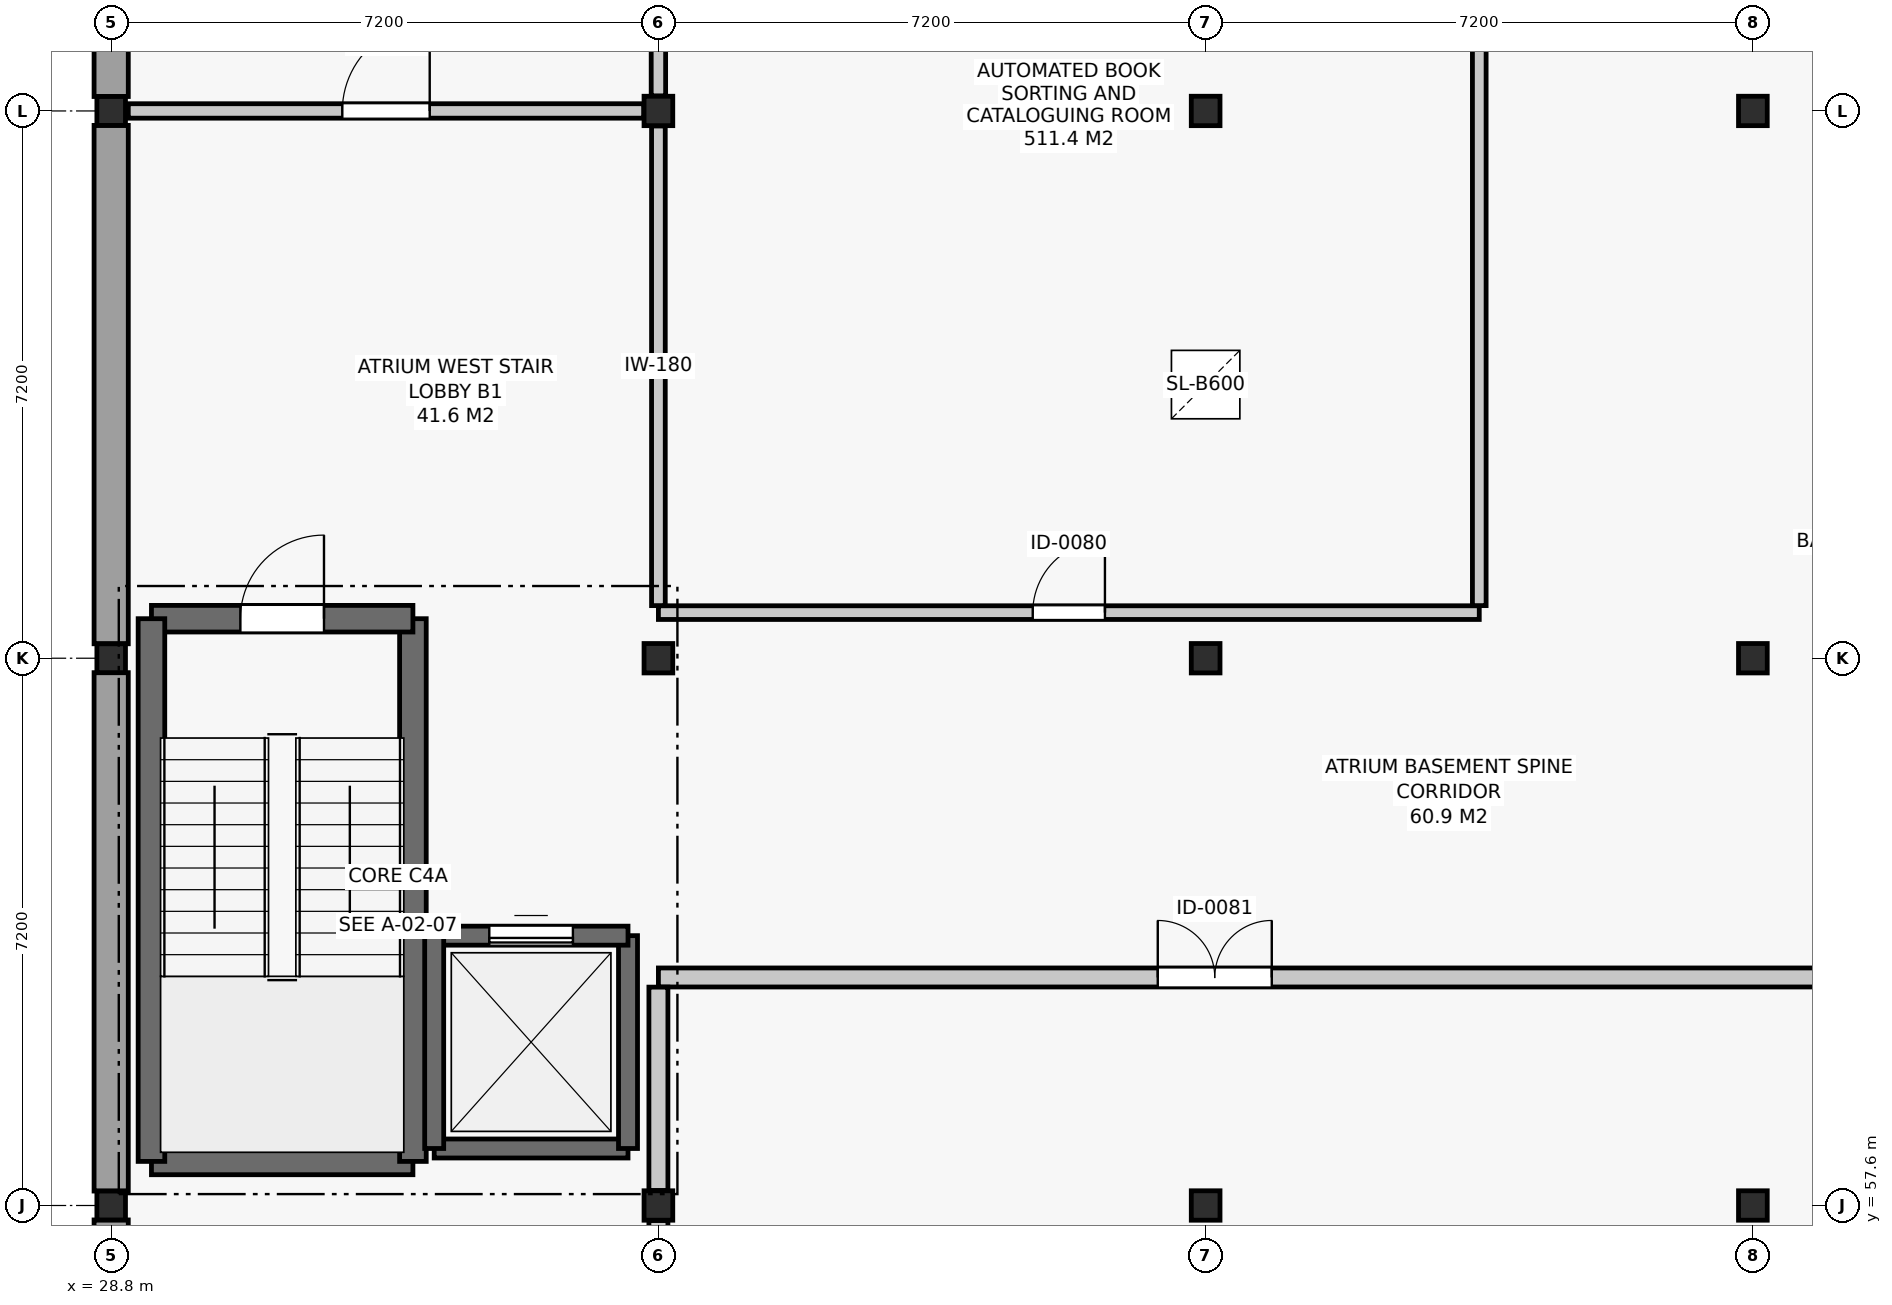
"""IFC4 building model, lengths in metres.
Left out: names, types, materials, properties, quantities, classifications, styles, units other than length and angle.
Written with IfcOpenShell. Run it as: python <this file> out.ifc"""

import sys

from ifc_helpers import new_model, si_unit, direction, frame, frame_2d, origin, origin_2d, place, context, subcontext, project, spatial, rectangle, i_section, extrude, element, fill, save


model = new_model("IFC4")
c1 = context("Model", 3, precision=1e-05, world=origin(), true_north=direction((0.0, 1.0)))
c2 = subcontext(c1, "Body", "Model", "MODEL_VIEW")
j1 = project(units=[si_unit("LENGTHUNIT", "METRE"), si_unit("PLANEANGLEUNIT", "RADIAN")], contexts=[c1])
p1 = place(None, origin())
s1 = spatial("IfcSite", under=j1, at=p1, CompositionType="ELEMENT")
p2 = place(p1, origin())
s2 = spatial("IfcBuilding", under=s1, at=p2, CompositionType="ELEMENT")
p3 = place(p2, frame((0.0, 0.0, -4.2)))
s3 = spatial("IfcBuildingStorey", under=s2, at=p3, CompositionType="ELEMENT", Elevation=-4.2)
for number, where, z_axis, x_axis in (
    (1, (28.8, 57.6, 0.0), (0.0, 0.0, 1.0), (1.0, 0.0, 0.0)),
    (2, (28.8, 64.8, 0.0), (0.0, 0.0, 1.0), (1.0, 0.0, 0.0)),
    (3, (28.8, 72.0, 0.0), (0.0, 0.0, 1.0), (1.0, 0.0, 0.0)),
):
    element("IfcColumn", number, at=place(p3, frame(where, z_axis=z_axis, x_axis=x_axis)), inside=s3, PredefinedType="COLUMN", context=c2, shape_type="SweptSolid", body=[
        extrude(i_section(OverallWidth=0.376, OverallDepth=0.38, WebThickness=0.017, FlangeThickness=0.027, FilletRadius=0.015, at=origin_2d()), origin(), (0.0, 0.0, 1.0), 4.2),
    ])
for number, where, z_axis, x_axis in (
    (4, (36.0, 57.6, 0.0), (0.0, 0.0, 1.0), (1.0, 0.0, 0.0)),
    (5, (36.0, 64.8, 0.0), (0.0, 0.0, 1.0), (1.0, 0.0, 0.0)),
    (6, (36.0, 72.0, 0.0), (0.0, 0.0, 1.0), (1.0, 0.0, 0.0)),
    (7, (43.2, 57.6, 0.0), (0.0, 0.0, 1.0), (1.0, 0.0, 0.0)),
    (8, (43.2, 64.8, 0.0), (0.0, 0.0, 1.0), (1.0, 0.0, 0.0)),
    (9, (43.2, 72.0, 0.0), (0.0, 0.0, 1.0), (1.0, 0.0, 0.0)),
    (10, (50.4, 57.6, 0.0), (0.0, 0.0, 1.0), (1.0, 0.0, 0.0)),
    (11, (50.4, 64.8, 0.0), (0.0, 0.0, 1.0), (1.0, 0.0, 0.0)),
    (12, (50.4, 72.0, 0.0), (0.0, 0.0, 1.0), (1.0, 0.0, 0.0)),
):
    element("IfcColumn", number, at=place(p3, frame(where, z_axis=z_axis, x_axis=x_axis)), inside=s3, PredefinedType="COLUMN", context=c2, shape_type="SweptSolid", body=[
        extrude(i_section(OverallWidth=0.378, OverallDepth=0.387, WebThickness=0.018, FlangeThickness=0.029, FilletRadius=0.015, at=origin_2d()), origin(), (0.0, 0.0, 1.0), 4.2),
    ])
p4 = place(p3, frame((28.8, 50.587, 0.0), z_axis=(0.0, 0.0, 1.0), x_axis=(0.0, 1.0, 0.0)))
e13 = element("IfcWall", 13, at=p4, inside=s3, PredefinedType="USERDEFINED", context=c2, shape_type="SweptSolid", body=[
    extrude(rectangle(XDim=6.823, YDim=0.45, at=frame_2d((3.411, 0.0))), origin(), (0.0, 0.0, 1.0), 3.26),
])
for number, where, z_axis, x_axis in (
    (14, (28.8, 57.79, 0.0), (0.0, 0.0, 1.0), (0.0, 1.0, 0.0)),
    (15, (28.8, 64.99, 0.0), (0.0, 0.0, 1.0), (0.0, 1.0, 0.0)),
    (16, (28.8, 72.19, 0.0), (0.0, 0.0, 1.0), (0.0, 1.0, 0.0)),
):
    element("IfcWall", number, at=place(p3, frame(where, z_axis=z_axis, x_axis=x_axis)), inside=s3, PredefinedType="USERDEFINED", context=c2, shape_type="SweptSolid", body=[
        extrude(rectangle(XDim=6.82, YDim=0.45, at=frame_2d((3.41, 0.0))), origin(), (0.0, 0.0, 1.0), 3.26),
    ])
p5 = place(p3, frame((29.33, 58.18, 0.0), z_axis=(0.0, 0.0, 1.0), x_axis=(1.0, 0.0, 0.0)))
e17 = element("IfcWall", 17, at=p5, inside=s3, PredefinedType="SHEAR", context=c2, shape_type="SweptSolid", body=[
    extrude(rectangle(XDim=3.44, YDim=0.35, at=frame_2d((1.72, 0.0))), origin(), (0.0, 0.0, 1.0), 3.88),
])
p6 = place(p3, frame((32.77, 58.18, 0.0), z_axis=(0.0, 0.0, 1.0), x_axis=(0.0, 1.0, 0.0)))
e18 = element("IfcWall", 18, at=p6, inside=s3, PredefinedType="SHEAR", context=c2, shape_type="SweptSolid", body=[
    extrude(rectangle(XDim=7.14, YDim=0.35, at=frame_2d((3.57, 0.0))), origin(), (0.0, 0.0, 1.0), 3.88),
])
p7 = place(p3, frame((32.77, 65.32, 0.0), z_axis=(0.0, 0.0, 1.0), x_axis=(-1.0, 0.0, 0.0)))
e19 = element("IfcWall", 19, at=p7, inside=s3, PredefinedType="SHEAR", context=c2, shape_type="SweptSolid", body=[
    extrude(rectangle(XDim=3.44, YDim=0.35, at=frame_2d((1.72, 0.0))), origin(), (0.0, 0.0, 1.0), 3.88),
])
p8 = place(p7, frame((1.17, 0.0, 0.0)))
e20 = element("IfcOpeningElement", 20, at=p8, cuts=e19, PredefinedType="OPENING", context=c2, shape_type="SweptSolid", body=[
    extrude(rectangle(XDim=1.1, YDim=2.15, at=frame_2d((0.55, 1.075))), frame((0.0, 0.187, 0.0), z_axis=(0.0, -1.0, 0.0), x_axis=(1.0, 0.0, 0.0)), (0.0, 0.0, 1.0), 0.374),
])
p9 = place(p3, frame((29.33, 65.32, 0.0), z_axis=(0.0, 0.0, 1.0), x_axis=(0.0, -1.0, 0.0)))
e21 = element("IfcWall", 21, at=p9, inside=s3, PredefinedType="SHEAR", context=c2, shape_type="SweptSolid", body=[
    extrude(rectangle(XDim=7.14, YDim=0.35, at=frame_2d((3.57, 0.0))), origin(), (0.0, 0.0, 1.0), 3.88),
])
p10 = place(p3, frame((33.05, 58.35, 0.0), z_axis=(0.0, 0.0, 1.0), x_axis=(1.0, 0.0, 0.0)))
e22 = element("IfcWall", 22, at=p10, inside=s3, PredefinedType="SHEAR", context=c2, shape_type="SweptSolid", body=[
    extrude(rectangle(XDim=2.55, YDim=0.25, at=frame_2d((1.275, 0.0))), origin(), (0.0, 0.0, 1.0), 3.88),
])
p11 = place(p3, frame((35.6, 58.35, 0.0), z_axis=(0.0, 0.0, 1.0), x_axis=(0.0, 1.0, 0.0)))
e23 = element("IfcWall", 23, at=p11, inside=s3, PredefinedType="SHEAR", context=c2, shape_type="SweptSolid", body=[
    extrude(rectangle(XDim=2.8, YDim=0.25, at=frame_2d((1.4, 0.0))), origin(), (0.0, 0.0, 1.0), 3.88),
])
p12 = place(p3, frame((35.6, 61.15, 0.0), z_axis=(0.0, 0.0, 1.0), x_axis=(-1.0, 0.0, 0.0)))
e24 = element("IfcWall", 24, at=p12, inside=s3, PredefinedType="SHEAR", context=c2, shape_type="SweptSolid", body=[
    extrude(rectangle(XDim=2.55, YDim=0.25, at=frame_2d((1.275, 0.0))), origin(), (0.0, 0.0, 1.0), 3.88),
])
p13 = place(p12, frame((0.725, 0.0, 0.0)))
e25 = element("IfcOpeningElement", 25, at=p13, cuts=e24, PredefinedType="OPENING", context=c2, shape_type="SweptSolid", body=[
    extrude(rectangle(XDim=1.1, YDim=2.1, at=frame_2d((0.55, 1.05))), frame((0.0, 0.137, 0.0), z_axis=(0.0, -1.0, 0.0), x_axis=(1.0, 0.0, 0.0)), (0.0, 0.0, 1.0), 0.274),
])
p14 = place(p3, frame((33.05, 61.15, 0.0), z_axis=(0.0, 0.0, 1.0), x_axis=(0.0, -1.0, 0.0)))
e26 = element("IfcWall", 26, at=p14, inside=s3, PredefinedType="SHEAR", context=c2, shape_type="SweptSolid", body=[
    extrude(rectangle(XDim=2.8, YDim=0.25, at=frame_2d((1.4, 0.0))), origin(), (0.0, 0.0, 1.0), 3.88),
])
p15 = place(p3, frame((29.025, 72.0, 0.0), z_axis=(0.0, 0.0, 1.0), x_axis=(1.0, 0.0, 0.0)))
e27 = element("IfcWall", 27, at=p15, inside=s3, PredefinedType="PARTITIONING", context=c2, shape_type="SweptSolid", body=[
    extrude(rectangle(XDim=6.782, YDim=0.19, at=frame_2d((3.391, 0.0))), origin(), (0.0, 0.0, 1.0), 3.375),
])
p16 = place(p15, frame((2.816, 0.0, 0.0)))
e28 = element("IfcOpeningElement", 28, at=p16, cuts=e27, PredefinedType="OPENING", context=c2, shape_type="SweptSolid", body=[
    extrude(rectangle(XDim=1.15, YDim=2.2, at=frame_2d((0.575, 1.1))), frame((0.0, 0.107, 0.0), z_axis=(0.0, -1.0, 0.0), x_axis=(1.0, 0.0, 0.0)), (0.0, 0.0, 1.0), 0.214),
])
p17 = place(p3, frame((36.0, 65.4, 0.0), z_axis=(0.0, 0.0, 1.0), x_axis=(1.0, 0.0, 0.0)))
e29 = element("IfcWall", 29, at=p17, inside=s3, PredefinedType="PARTITIONING", context=c2, shape_type="SweptSolid", body=[
    extrude(rectangle(XDim=10.8, YDim=0.18, at=frame_2d((5.4, 0.0))), origin(), (0.0, 0.0, 1.0), 3.415),
])
p18 = place(p17, frame((4.925, 0.0, 0.0)))
e30 = element("IfcOpeningElement", 30, at=p18, cuts=e29, PredefinedType="OPENING", context=c2, shape_type="SweptSolid", body=[
    extrude(rectangle(XDim=0.95, YDim=2.15, at=frame_2d((0.475, 1.075))), frame((0.0, 0.102, 0.0), z_axis=(0.0, -1.0, 0.0), x_axis=(1.0, 0.0, 0.0)), (0.0, 0.0, 1.0), 0.204),
])
p19 = place(p3, frame((36.0, 60.6, 0.0), z_axis=(0.0, 0.0, 1.0), x_axis=(1.0, 0.0, 0.0)))
e31 = element("IfcWall", 31, at=p19, inside=s3, PredefinedType="SOLIDWALL", context=c2, shape_type="SweptSolid", body=[
    extrude(rectangle(XDim=18.398, YDim=0.25, at=frame_2d((9.199, 0.0))), origin(), (0.0, 0.0, 1.0), 3.415),
])
p20 = place(p19, frame((6.57, 0.0, 0.0)))
e32 = element("IfcOpeningElement", 32, at=p20, cuts=e31, PredefinedType="OPENING", context=c2, shape_type="SweptSolid", body=[
    extrude(rectangle(XDim=1.5, YDim=2.2, at=frame_2d((0.75, 1.1))), frame((0.0, 0.137, 0.0), z_axis=(0.0, -1.0, 0.0), x_axis=(1.0, 0.0, 0.0)), (0.0, 0.0, 1.0), 0.274),
])
p21 = place(p3, frame((36.0, 72.198, 0.0), z_axis=(0.0, 0.0, 1.0), x_axis=(0.0, 1.0, 0.0)))
e33 = element("IfcWall", 33, at=p21, inside=s3, PredefinedType="PARTITIONING", context=c2, shape_type="SweptSolid", body=[
    extrude(rectangle(XDim=6.805, YDim=0.19, at=frame_2d((3.402, 0.0))), origin(), (0.0, 0.0, 1.0), 3.425),
])
p22 = place(p3, frame((36.0, 65.492, 0.0), z_axis=(0.0, 0.0, 1.0), x_axis=(0.0, 1.0, 0.0)))
e34 = element("IfcWall", 34, at=p22, inside=s3, PredefinedType="PARTITIONING", context=c2, shape_type="SweptSolid", body=[
    extrude(rectangle(XDim=6.311, YDim=0.18, at=frame_2d((3.155, 0.0))), origin(), (0.0, 0.0, 1.0), 3.425),
])
p23 = place(p3, frame((46.8, 65.492, 0.0), z_axis=(0.0, 0.0, 1.0), x_axis=(0.0, 1.0, 0.0)))
e35 = element("IfcWall", 35, at=p23, inside=s3, PredefinedType="PARTITIONING", context=c2, shape_type="SweptSolid", body=[
    extrude(rectangle(XDim=49.483, YDim=0.18, at=frame_2d((24.742, 0.0))), origin(), (0.0, 0.0, 1.0), 3.375),
])
p24 = place(p23, frame((30.233, 0.0, 0.0)))
e36 = element("IfcOpeningElement", 36, at=p24, cuts=e35, PredefinedType="OPENING", context=c2, shape_type="SweptSolid", body=[
    extrude(rectangle(XDim=0.95, YDim=2.15, at=frame_2d((0.475, 1.075))), frame((0.0, 0.102, 0.0), z_axis=(0.0, -1.0, 0.0), x_axis=(1.0, 0.0, 0.0)), (0.0, 0.0, 1.0), 0.204),
])
p25 = place(p3, frame((36.0, 50.625, 0.0), z_axis=(0.0, 0.0, 1.0), x_axis=(0.0, 1.0, 0.0)))
e37 = element("IfcWall", 37, at=p25, inside=s3, PredefinedType="SOLIDWALL", context=c2, shape_type="SweptSolid", body=[
    extrude(rectangle(XDim=6.778, YDim=0.25, at=frame_2d((3.389, 0.0))), origin(), (0.0, 0.0, 1.0), 3.425),
])
p26 = place(p3, frame((36.0, 57.798, 0.0), z_axis=(0.0, 0.0, 1.0), x_axis=(0.0, 1.0, 0.0)))
e38 = element("IfcWall", 38, at=p26, inside=s3, PredefinedType="SOLIDWALL", context=c2, shape_type="SweptSolid", body=[
    extrude(rectangle(XDim=2.675, YDim=0.25, at=frame_2d((1.338, 0.0))), origin(), (0.0, 0.0, 1.0), 3.425),
])
p27 = place(p8, frame((1.1, 0.0, 0.0), z_axis=(0.0, 0.0, 1.0), x_axis=(-1.0, 0.0, 0.0)))
e39 = element("IfcDoor", 39, at=p27, inside=s3, OperationType="SINGLE_SWING_RIGHT", PredefinedType="DOOR", context=c2, shape_type="SweptSolid", body=[
    extrude(rectangle(XDim=1.1, YDim=2.15, at=frame_2d((0.55, 1.075))), frame((0.0, 0.025, 0.0), z_axis=(0.0, -1.0, 0.0), x_axis=(1.0, 0.0, 0.0)), (0.0, 0.0, 1.0), 0.05),
])
fill(e20, e39)
p28 = place(p13, origin())
e40 = element("IfcDoor", 40, at=p28, inside=s3, OperationType="SLIDING_TO_LEFT", PredefinedType="DOOR", context=c2, shape_type="SweptSolid", body=[
    extrude(rectangle(XDim=1.1, YDim=2.1, at=frame_2d((0.55, 1.05))), frame((0.0, 0.025, 0.0), z_axis=(0.0, -1.0, 0.0), x_axis=(1.0, 0.0, 0.0)), (0.0, 0.0, 1.0), 0.05),
])
fill(e25, e40)
p29 = place(p16, origin())
e41 = element("IfcDoor", 41, at=p29, inside=s3, OperationType="SINGLE_SWING_RIGHT", PredefinedType="DOOR", context=c2, shape_type="SweptSolid", body=[
    extrude(rectangle(XDim=1.15, YDim=2.2, at=frame_2d((0.575, 1.1))), frame((0.0, 0.025, 0.0), z_axis=(0.0, -1.0, 0.0), x_axis=(1.0, 0.0, 0.0)), (0.0, 0.0, 1.0), 0.05),
])
fill(e28, e41)
p30 = place(p18, origin())
e42 = element("IfcDoor", 42, at=p30, inside=s3, OperationType="SINGLE_SWING_RIGHT", PredefinedType="DOOR", context=c2, shape_type="SweptSolid", body=[
    extrude(rectangle(XDim=0.95, YDim=2.15, at=frame_2d((0.475, 1.075))), frame((0.0, 0.025, 0.0), z_axis=(0.0, -1.0, 0.0), x_axis=(1.0, 0.0, 0.0)), (0.0, 0.0, 1.0), 0.05),
])
fill(e30, e42)
p31 = place(p20, origin())
e43 = element("IfcDoor", 43, at=p31, inside=s3, OperationType="DOUBLE_DOOR_SINGLE_SWING", PredefinedType="DOOR", context=c2, shape_type="SweptSolid", body=[
    extrude(rectangle(XDim=1.5, YDim=2.2, at=frame_2d((0.75, 1.1))), frame((0.0, 0.025, 0.0), z_axis=(0.0, -1.0, 0.0), x_axis=(1.0, 0.0, 0.0)), (0.0, 0.0, 1.0), 0.05),
])
fill(e32, e43)
save(model, sys.argv[1])
